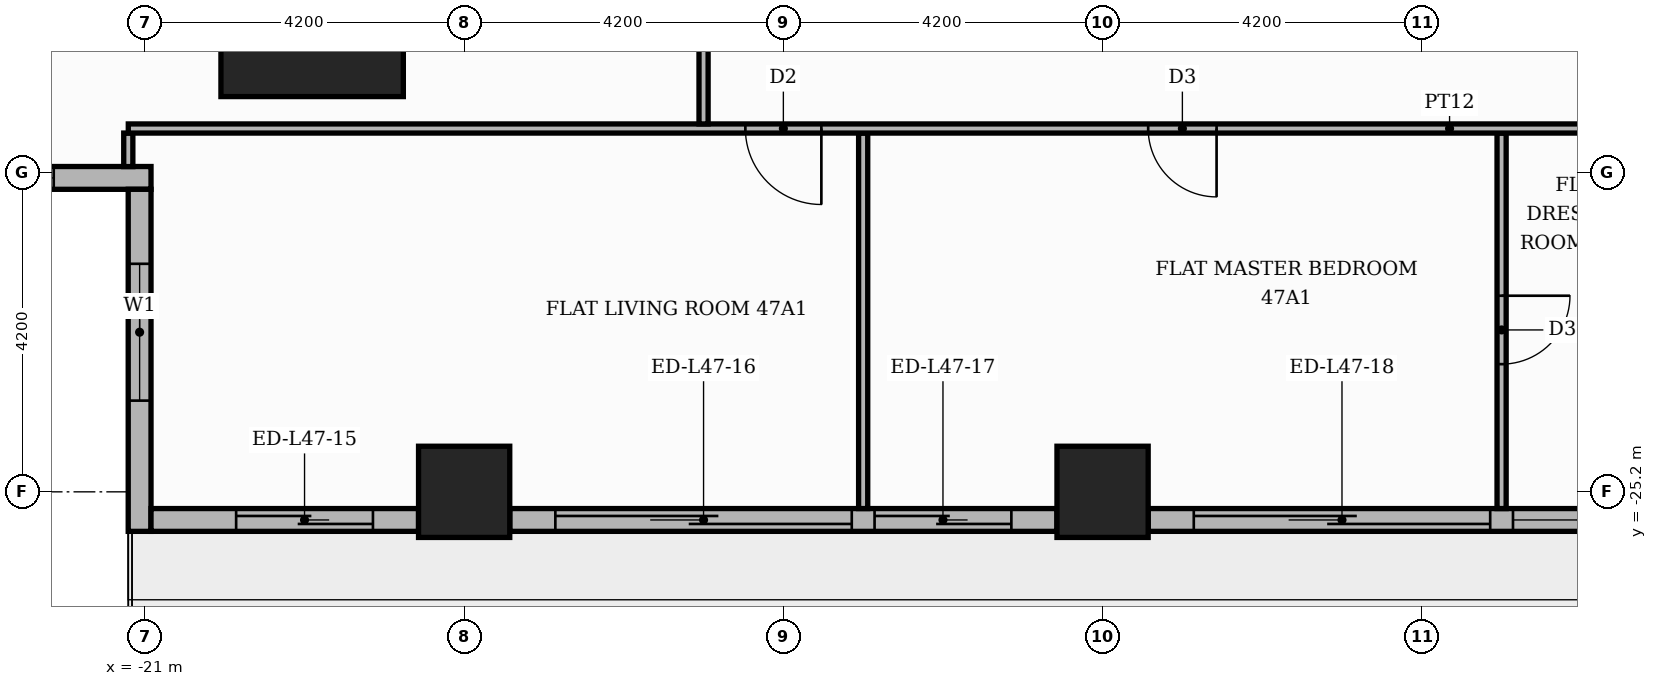
"""IFC4 building model, lengths in metres.
Left out: names, types, materials, properties, quantities, classifications, styles, units other than length and angle.
Written with IfcOpenShell. Run it as: python <this file> out.ifc"""

import sys

from ifc_helpers import new_model, si_unit, direction, frame, frame_2d, origin, origin_2d, place, context, subcontext, project, spatial, rectangle, extrude, element, fill, save


model = new_model("IFC4")
c1 = context("Model", 3, precision=1e-05, world=origin(), true_north=direction((0.0, 1.0)))
c2 = subcontext(c1, "Body", "Model", "MODEL_VIEW")
j1 = project(units=[si_unit("LENGTHUNIT", "METRE"), si_unit("PLANEANGLEUNIT", "RADIAN")], contexts=[c1])
p1 = place(None, origin())
s1 = spatial("IfcSite", under=j1, at=p1, CompositionType="ELEMENT")
p2 = place(p1, origin())
s2 = spatial("IfcBuilding", under=s1, at=p2, CompositionType="ELEMENT")
p3 = place(p2, frame((0.0, 0.0, 200.1)))
s3 = spatial("IfcBuildingStorey", under=s2, at=p3, CompositionType="ELEMENT", Elevation=200.1)
p4 = place(p3, frame((-18.8, -18.8, 0.0), z_axis=(0.0, 0.0, 1.0), x_axis=(1.0, 0.0, 0.0)))
e1 = element("IfcColumn", 1, at=p4, inside=s3, PredefinedType="COLUMN", context=c2, shape_type="SweptSolid", body=[
    extrude(rectangle(XDim=2.4, YDim=2.4, at=origin_2d()), origin(), (0.0, 0.0, 1.0), 3.9),
])
for number, where, z_axis, x_axis in (
    (2, (-8.4, -25.2, 0.0), (0.0, 0.0, 1.0), (1.0, 0.0, 0.0)),
    (3, (-16.8, -25.2, 0.0), (0.0, 0.0, 1.0), (1.0, 0.0, 0.0)),
):
    element("IfcColumn", number, at=place(p3, frame(where, z_axis=z_axis, x_axis=x_axis)), inside=s3, PredefinedType="COLUMN", context=c2, shape_type="SweptSolid", body=[
        extrude(rectangle(XDim=1.2, YDim=1.2, at=origin_2d()), origin(), (0.0, 0.0, 1.0), 3.9),
    ])
p5 = place(p3, frame((-25.42, -21.07, 0.0), z_axis=(0.0, 0.0, 1.0), x_axis=(1.0, 0.0, 0.0)))
e4 = element("IfcWall", 4, at=p5, inside=s3, PredefinedType="STANDARD", context=c2, shape_type="SweptSolid", body=[
    extrude(rectangle(XDim=4.5, YDim=0.3, at=frame_2d((2.25, 0.0))), origin(), (0.0, 0.0, 1.0), 3.48),
])
p6 = place(p5, frame((1.42, 0.0, 0.9)))
e5 = element("IfcOpeningElement", 5, at=p6, cuts=e4, PredefinedType="OPENING", context=c2, shape_type="SweptSolid", body=[
    extrude(rectangle(XDim=1.8, YDim=2.1, at=frame_2d((0.9, 1.05))), frame((0.0, 0.16, 0.0), z_axis=(0.0, -1.0, 0.0), x_axis=(1.0, 0.0, 0.0)), (0.0, 0.0, 1.0), 0.32),
])
p7 = place(p3, frame((-21.07, -21.22, 0.0), z_axis=(0.0, 0.0, 1.0), x_axis=(0.0, -1.0, 0.0)))
e6 = element("IfcWall", 6, at=p7, inside=s3, PredefinedType="STANDARD", context=c2, shape_type="SweptSolid", body=[
    extrude(rectangle(XDim=4.5, YDim=0.3, at=frame_2d((2.25, 0.0))), origin(), (0.0, 0.0, 1.0), 3.48),
])
p8 = place(p7, frame((0.98, 0.0, 0.9)))
e7 = element("IfcOpeningElement", 7, at=p8, cuts=e6, PredefinedType="OPENING", context=c2, shape_type="SweptSolid", body=[
    extrude(rectangle(XDim=1.8, YDim=2.1, at=frame_2d((0.9, 1.05))), frame((0.0, 0.16, 0.0), z_axis=(0.0, -1.0, 0.0), x_axis=(1.0, 0.0, 0.0)), (0.0, 0.0, 1.0), 0.32),
])
p9 = place(p3, frame((-20.92, -25.57, 0.0), z_axis=(0.0, 0.0, 1.0), x_axis=(1.0, 0.0, 0.0)))
e8 = element("IfcWall", 8, at=p9, inside=s3, PredefinedType="STANDARD", context=c2, shape_type="SweptSolid", body=[
    extrude(rectangle(XDim=3.52, YDim=0.3, at=frame_2d((1.76, 0.0))), origin(), (0.0, 0.0, 1.0), 3.48),
])
p10 = place(p9, frame((1.12, 0.0, 0.0)))
e9 = element("IfcOpeningElement", 9, at=p10, cuts=e8, PredefinedType="OPENING", context=c2, shape_type="SweptSolid", body=[
    extrude(rectangle(XDim=1.8, YDim=2.4, at=frame_2d((0.9, 1.2))), frame((0.0, 0.16, 0.0), z_axis=(0.0, -1.0, 0.0), x_axis=(1.0, 0.0, 0.0)), (0.0, 0.0, 1.0), 0.32),
])
p11 = place(p3, frame((-16.2, -25.57, 0.0), z_axis=(0.0, 0.0, 1.0), x_axis=(1.0, 0.0, 0.0)))
e10 = element("IfcWall", 10, at=p11, inside=s3, PredefinedType="STANDARD", context=c2, shape_type="SweptSolid", body=[
    extrude(rectangle(XDim=7.2, YDim=0.3, at=frame_2d((3.6, 0.0))), origin(), (0.0, 0.0, 1.0), 3.48),
])
p12 = place(p11, frame((0.6, 0.0, 0.0)))
e11 = element("IfcOpeningElement", 11, at=p12, cuts=e10, PredefinedType="OPENING", context=c2, shape_type="SweptSolid", body=[
    extrude(rectangle(XDim=3.9, YDim=2.4, at=frame_2d((1.95, 1.2))), frame((0.0, 0.16, 0.0), z_axis=(0.0, -1.0, 0.0), x_axis=(1.0, 0.0, 0.0)), (0.0, 0.0, 1.0), 0.32),
])
p13 = place(p11, frame((4.8, 0.0, 0.0)))
e12 = element("IfcOpeningElement", 12, at=p13, cuts=e10, PredefinedType="OPENING", context=c2, shape_type="SweptSolid", body=[
    extrude(rectangle(XDim=1.8, YDim=2.4, at=frame_2d((0.9, 1.2))), frame((0.0, 0.16, 0.0), z_axis=(0.0, -1.0, 0.0), x_axis=(1.0, 0.0, 0.0)), (0.0, 0.0, 1.0), 0.32),
])
p14 = place(p3, frame((-7.8, -25.57, 0.0), z_axis=(0.0, 0.0, 1.0), x_axis=(1.0, 0.0, 0.0)))
e13 = element("IfcWall", 13, at=p14, inside=s3, PredefinedType="STANDARD", context=c2, shape_type="SweptSolid", body=[
    extrude(rectangle(XDim=7.2, YDim=0.3, at=frame_2d((3.6, 0.0))), origin(), (0.0, 0.0, 1.0), 3.48),
])
p15 = place(p14, frame((0.6, 0.0, 0.0)))
e14 = element("IfcOpeningElement", 14, at=p15, cuts=e13, PredefinedType="OPENING", context=c2, shape_type="SweptSolid", body=[
    extrude(rectangle(XDim=3.9, YDim=2.4, at=frame_2d((1.95, 1.2))), frame((0.0, 0.16, 0.0), z_axis=(0.0, -1.0, 0.0), x_axis=(1.0, 0.0, 0.0)), (0.0, 0.0, 1.0), 0.32),
])
p16 = place(p14, frame((4.8, 0.0, 0.9)))
e15 = element("IfcOpeningElement", 15, at=p16, cuts=e13, PredefinedType="OPENING", context=c2, shape_type="SweptSolid", body=[
    extrude(rectangle(XDim=1.8, YDim=2.1, at=frame_2d((0.9, 1.05))), frame((0.0, 0.16, 0.0), z_axis=(0.0, -1.0, 0.0), x_axis=(1.0, 0.0, 0.0)), (0.0, 0.0, 1.0), 0.32),
])
p17 = place(p3, frame((-11.55, -25.42, 0.0), z_axis=(0.0, 0.0, 1.0), x_axis=(0.0, 1.0, 0.0)))
e16 = element("IfcWall", 16, at=p17, inside=s3, PredefinedType="PARTITIONING", context=c2, shape_type="SweptSolid", body=[
    extrude(rectangle(XDim=4.94, YDim=0.12, at=frame_2d((2.47, 0.0))), origin(), (0.0, 0.0, 1.0), 3.48),
])
p18 = place(p3, frame((-3.15, -25.42, 0.0), z_axis=(0.0, 0.0, 1.0), x_axis=(0.0, 1.0, 0.0)))
e17 = element("IfcWall", 17, at=p18, inside=s3, PredefinedType="PARTITIONING", context=c2, shape_type="SweptSolid", body=[
    extrude(rectangle(XDim=4.94, YDim=0.12, at=frame_2d((2.47, 0.0))), origin(), (0.0, 0.0, 1.0), 3.48),
])
p19 = place(p18, frame((1.9, 0.0, 0.0)))
e18 = element("IfcOpeningElement", 18, at=p19, cuts=e17, PredefinedType="OPENING", context=c2, shape_type="SweptSolid", body=[
    extrude(rectangle(XDim=0.9, YDim=2.1, at=frame_2d((0.45, 1.05))), frame((0.0, 0.07, 0.0), z_axis=(0.0, -1.0, 0.0), x_axis=(1.0, 0.0, 0.0)), (0.0, 0.0, 1.0), 0.14),
])
p20 = place(p3, frame((-21.219, -20.921, 0.0), z_axis=(0.0, 0.0, 1.0), x_axis=(0.0, 1.0, 0.0)))
e19 = element("IfcWall", 19, at=p20, inside=s3, PredefinedType="PARTITIONING", context=c2, shape_type="SweptSolid", body=[
    extrude(rectangle(XDim=0.441, YDim=0.12, at=frame_2d((0.22, 0.0))), origin(), (0.0, 0.0, 1.0), 3.48),
])
p21 = place(p3, frame((-21.219, -20.42, 0.0), z_axis=(0.0, 0.0, 1.0), x_axis=(1.0, 0.0, 0.0)))
e20 = element("IfcWall", 20, at=p21, inside=s3, PredefinedType="PARTITIONING", context=c2, shape_type="SweptSolid", body=[
    extrude(rectangle(XDim=34.769, YDim=0.12, at=frame_2d((17.385, 0.0))), origin(), (0.0, 0.0, 1.0), 3.48),
])
p22 = place(p21, frame((8.119, 0.0, 0.0)))
e21 = element("IfcOpeningElement", 21, at=p22, cuts=e20, PredefinedType="OPENING", context=c2, shape_type="SweptSolid", body=[
    extrude(rectangle(XDim=1.0, YDim=2.1, at=frame_2d((0.5, 1.05))), frame((0.0, 0.07, 0.0), z_axis=(0.0, -1.0, 0.0), x_axis=(1.0, 0.0, 0.0)), (0.0, 0.0, 1.0), 0.14),
])
p23 = place(p21, frame((13.419, 0.0, 0.0)))
e22 = element("IfcOpeningElement", 22, at=p23, cuts=e20, PredefinedType="OPENING", context=c2, shape_type="SweptSolid", body=[
    extrude(rectangle(XDim=0.9, YDim=2.1, at=frame_2d((0.45, 1.05))), frame((0.0, 0.07, 0.0), z_axis=(0.0, -1.0, 0.0), x_axis=(1.0, 0.0, 0.0)), (0.0, 0.0, 1.0), 0.14),
])
p24 = place(p21, frame((23.919, 0.0, 0.0)))
e23 = element("IfcOpeningElement", 23, at=p24, cuts=e20, PredefinedType="OPENING", context=c2, shape_type="SweptSolid", body=[
    extrude(rectangle(XDim=0.9, YDim=2.1, at=frame_2d((0.45, 1.05))), frame((0.0, 0.07, 0.0), z_axis=(0.0, -1.0, 0.0), x_axis=(1.0, 0.0, 0.0)), (0.0, 0.0, 1.0), 0.14),
])
p25 = place(p21, frame((31.269, 0.0, 0.0)))
e24 = element("IfcOpeningElement", 24, at=p25, cuts=e20, PredefinedType="OPENING", context=c2, shape_type="SweptSolid", body=[
    extrude(rectangle(XDim=0.9, YDim=2.1, at=frame_2d((0.45, 1.05))), frame((0.0, 0.07, 0.0), z_axis=(0.0, -1.0, 0.0), x_axis=(1.0, 0.0, 0.0)), (0.0, 0.0, 1.0), 0.14),
])
p26 = place(p3, frame((-13.65, -20.36, 0.0), z_axis=(0.0, 0.0, 1.0), x_axis=(0.0, 1.0, 0.0)))
e25 = element("IfcWall", 25, at=p26, inside=s3, PredefinedType="PARTITIONING", context=c2, shape_type="SweptSolid", body=[
    extrude(rectangle(XDim=6.61, YDim=0.12, at=frame_2d((3.305, 0.0))), origin(), (0.0, 0.0, 1.0), 3.48),
])
p27 = place(p26, frame((2.825, 0.0, 0.0)))
e26 = element("IfcOpeningElement", 26, at=p27, cuts=e25, PredefinedType="OPENING", context=c2, shape_type="SweptSolid", body=[
    extrude(rectangle(XDim=1.0, YDim=2.1, at=frame_2d((0.5, 1.05))), frame((0.0, 0.07, 0.0), z_axis=(0.0, -1.0, 0.0), x_axis=(1.0, 0.0, 0.0)), (0.0, 0.0, 1.0), 0.14),
])
p28 = place(p6, origin())
e27 = element("IfcWindow", 27, at=p28, inside=s3, PartitioningType="SINGLE_PANEL", PredefinedType="WINDOW", context=c2, shape_type="SweptSolid", body=[
    extrude(rectangle(XDim=1.8, YDim=2.1, at=frame_2d((0.9, 1.05))), frame((0.0, 0.03, 0.0), z_axis=(0.0, -1.0, 0.0), x_axis=(1.0, 0.0, 0.0)), (0.0, 0.0, 1.0), 0.06),
])
fill(e5, e27)
p29 = place(p8, origin())
e28 = element("IfcWindow", 28, at=p29, inside=s3, PartitioningType="SINGLE_PANEL", PredefinedType="WINDOW", context=c2, shape_type="SweptSolid", body=[
    extrude(rectangle(XDim=1.8, YDim=2.1, at=frame_2d((0.9, 1.05))), frame((0.0, 0.03, 0.0), z_axis=(0.0, -1.0, 0.0), x_axis=(1.0, 0.0, 0.0)), (0.0, 0.0, 1.0), 0.06),
])
fill(e7, e28)
p30 = place(p10, origin())
e29 = element("IfcDoor", 29, at=p30, inside=s3, OperationType="SLIDING_TO_RIGHT", PredefinedType="DOOR", context=c2, shape_type="SweptSolid", body=[
    extrude(rectangle(XDim=1.8, YDim=2.4, at=frame_2d((0.9, 1.2))), frame((0.0, 0.025, 0.0), z_axis=(0.0, -1.0, 0.0), x_axis=(1.0, 0.0, 0.0)), (0.0, 0.0, 1.0), 0.05),
])
fill(e9, e29)
p31 = place(p12, origin())
e30 = element("IfcDoor", 30, at=p31, inside=s3, OperationType="SLIDING_TO_LEFT", PredefinedType="DOOR", context=c2, shape_type="SweptSolid", body=[
    extrude(rectangle(XDim=3.9, YDim=2.4, at=frame_2d((1.95, 1.2))), frame((0.0, 0.025, 0.0), z_axis=(0.0, -1.0, 0.0), x_axis=(1.0, 0.0, 0.0)), (0.0, 0.0, 1.0), 0.05),
])
fill(e11, e30)
p32 = place(p13, origin())
e31 = element("IfcDoor", 31, at=p32, inside=s3, OperationType="SLIDING_TO_RIGHT", PredefinedType="DOOR", context=c2, shape_type="SweptSolid", body=[
    extrude(rectangle(XDim=1.8, YDim=2.4, at=frame_2d((0.9, 1.2))), frame((0.0, 0.025, 0.0), z_axis=(0.0, -1.0, 0.0), x_axis=(1.0, 0.0, 0.0)), (0.0, 0.0, 1.0), 0.05),
])
fill(e12, e31)
p33 = place(p15, origin())
e32 = element("IfcDoor", 32, at=p33, inside=s3, OperationType="SLIDING_TO_LEFT", PredefinedType="DOOR", context=c2, shape_type="SweptSolid", body=[
    extrude(rectangle(XDim=3.9, YDim=2.4, at=frame_2d((1.95, 1.2))), frame((0.0, 0.025, 0.0), z_axis=(0.0, -1.0, 0.0), x_axis=(1.0, 0.0, 0.0)), (0.0, 0.0, 1.0), 0.05),
])
fill(e14, e32)
p34 = place(p16, origin())
e33 = element("IfcWindow", 33, at=p34, inside=s3, PartitioningType="SINGLE_PANEL", PredefinedType="WINDOW", context=c2, shape_type="SweptSolid", body=[
    extrude(rectangle(XDim=1.8, YDim=2.1, at=frame_2d((0.9, 1.05))), frame((0.0, 0.03, 0.0), z_axis=(0.0, -1.0, 0.0), x_axis=(1.0, 0.0, 0.0)), (0.0, 0.0, 1.0), 0.06),
])
fill(e15, e33)
p35 = place(p22, frame((1.0, 0.0, 0.0), z_axis=(0.0, 0.0, 1.0), x_axis=(-1.0, 0.0, 0.0)))
e34 = element("IfcDoor", 34, at=p35, inside=s3, OperationType="SINGLE_SWING_RIGHT", PredefinedType="DOOR", context=c2, shape_type="SweptSolid", body=[
    extrude(rectangle(XDim=1.0, YDim=2.1, at=frame_2d((0.5, 1.05))), frame((0.0, 0.025, 0.0), z_axis=(0.0, -1.0, 0.0), x_axis=(1.0, 0.0, 0.0)), (0.0, 0.0, 1.0), 0.05),
])
fill(e21, e34)
p36 = place(p23, frame((0.9, 0.0, 0.0), z_axis=(0.0, 0.0, 1.0), x_axis=(-1.0, 0.0, 0.0)))
e35 = element("IfcDoor", 35, at=p36, inside=s3, OperationType="SINGLE_SWING_RIGHT", PredefinedType="DOOR", context=c2, shape_type="SweptSolid", body=[
    extrude(rectangle(XDim=0.9, YDim=2.1, at=frame_2d((0.45, 1.05))), frame((0.0, 0.025, 0.0), z_axis=(0.0, -1.0, 0.0), x_axis=(1.0, 0.0, 0.0)), (0.0, 0.0, 1.0), 0.05),
])
fill(e22, e35)
p37 = place(p19, frame((0.9, 0.0, 0.0), z_axis=(0.0, 0.0, 1.0), x_axis=(-1.0, 0.0, 0.0)))
e36 = element("IfcDoor", 36, at=p37, inside=s3, OperationType="SINGLE_SWING_RIGHT", PredefinedType="DOOR", context=c2, shape_type="SweptSolid", body=[
    extrude(rectangle(XDim=0.9, YDim=2.1, at=frame_2d((0.45, 1.05))), frame((0.0, 0.025, 0.0), z_axis=(0.0, -1.0, 0.0), x_axis=(1.0, 0.0, 0.0)), (0.0, 0.0, 1.0), 0.05),
])
fill(e18, e36)
save(model, sys.argv[1])
